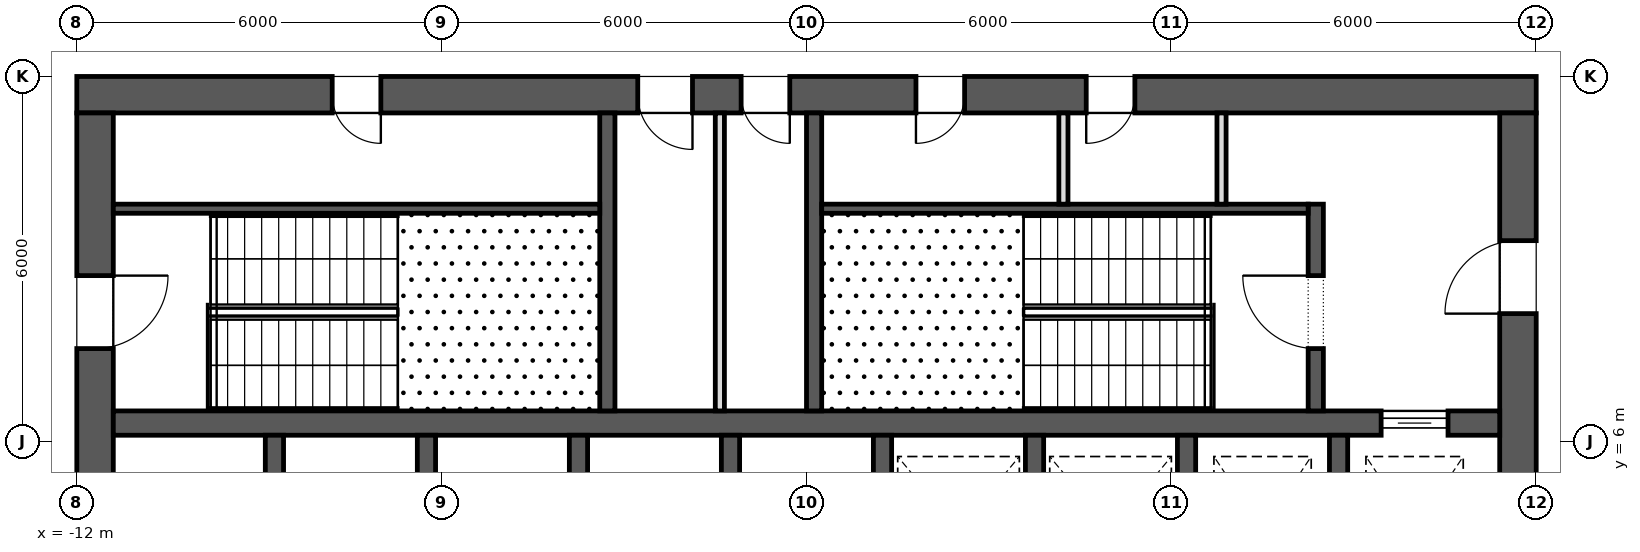
"""IFC4 building model, lengths in metres.
Left out: names, types, materials, properties, quantities, classifications, styles, units other than length and angle.
Written with IfcOpenShell. Run it as: python <this file> out.ifc"""

import sys

from ifc_helpers import new_model, si_unit, direction, frame, frame_2d, origin, place, context, subcontext, project, spatial, rectangle, extrude, element, fill, save


model = new_model("IFC4")
c1 = context("Model", 3, precision=1e-05, world=origin(), true_north=direction((0.0, 1.0)))
c2 = subcontext(c1, "Body", "Model", "MODEL_VIEW")
j1 = project(units=[si_unit("LENGTHUNIT", "METRE"), si_unit("PLANEANGLEUNIT", "RADIAN")], contexts=[c1])
p1 = place(None, origin())
s1 = spatial("IfcSite", under=j1, at=p1, CompositionType="ELEMENT")
p2 = place(p1, origin())
s2 = spatial("IfcBuilding", under=s1, at=p2, CompositionType="ELEMENT")
p3 = place(p2, frame((0.0, 0.0, 117.1)))
s3 = spatial("IfcBuildingStorey", under=s2, at=p3, CompositionType="ELEMENT", Elevation=117.1)
p4 = place(p3, frame((-12.0, 11.7, 0.0), z_axis=(0.0, 0.0, 1.0), x_axis=(1.0, 0.0, 0.0)))
e1 = element("IfcWall", 1, at=p4, inside=s3, PredefinedType="SHEAR", context=c2, shape_type="SweptSolid", body=[
    extrude(rectangle(XDim=24.0, YDim=0.6, at=frame_2d((12.0, 0.0))), origin(), (0.0, 0.0, 1.0), 4.2),
])
p5 = place(p4, frame((9.225, 0.0, 0.0)))
e2 = element("IfcOpeningElement", 2, at=p5, cuts=e1, PredefinedType="OPENING", context=c2, shape_type="SweptSolid", body=[
    extrude(rectangle(XDim=0.9, YDim=2.1, at=frame_2d((0.45, 1.05))), frame((0.0, 0.312, 0.0), z_axis=(0.0, -1.0, 0.0), x_axis=(1.0, 0.0, 0.0)), (0.0, 0.0, 1.0), 0.624),
])
p6 = place(p4, frame((10.925, 0.0, 0.0)))
e3 = element("IfcOpeningElement", 3, at=p6, cuts=e1, PredefinedType="OPENING", context=c2, shape_type="SweptSolid", body=[
    extrude(rectangle(XDim=0.8, YDim=2.1, at=frame_2d((0.4, 1.05))), frame((0.0, 0.312, 0.0), z_axis=(0.0, -1.0, 0.0), x_axis=(1.0, 0.0, 0.0)), (0.0, 0.0, 1.0), 0.624),
])
p7 = place(p4, frame((4.2, 0.0, 0.0)))
e4 = element("IfcOpeningElement", 4, at=p7, cuts=e1, PredefinedType="OPENING", context=c2, shape_type="SweptSolid", body=[
    extrude(rectangle(XDim=0.8, YDim=2.1, at=frame_2d((0.4, 1.05))), frame((0.0, 0.312, 0.0), z_axis=(0.0, -1.0, 0.0), x_axis=(1.0, 0.0, 0.0)), (0.0, 0.0, 1.0), 0.624),
])
p8 = place(p4, frame((13.8, 0.0, 0.0)))
e5 = element("IfcOpeningElement", 5, at=p8, cuts=e1, PredefinedType="OPENING", context=c2, shape_type="SweptSolid", body=[
    extrude(rectangle(XDim=0.8, YDim=2.1, at=frame_2d((0.4, 1.05))), frame((0.0, 0.312, 0.0), z_axis=(0.0, -1.0, 0.0), x_axis=(1.0, 0.0, 0.0)), (0.0, 0.0, 1.0), 0.624),
])
p9 = place(p4, frame((16.6, 0.0, 0.0)))
e6 = element("IfcOpeningElement", 6, at=p9, cuts=e1, PredefinedType="OPENING", context=c2, shape_type="SweptSolid", body=[
    extrude(rectangle(XDim=0.8, YDim=2.1, at=frame_2d((0.4, 1.05))), frame((0.0, 0.312, 0.0), z_axis=(0.0, -1.0, 0.0), x_axis=(1.0, 0.0, 0.0)), (0.0, 0.0, 1.0), 0.624),
])
p10 = place(p3, frame((11.7, -11.4, 0.0), z_axis=(0.0, 0.0, 1.0), x_axis=(0.0, 1.0, 0.0)))
e7 = element("IfcWall", 7, at=p10, inside=s3, PredefinedType="SHEAR", context=c2, shape_type="SweptSolid", body=[
    extrude(rectangle(XDim=22.8, YDim=0.6, at=frame_2d((11.4, 0.0))), origin(), (0.0, 0.0, 1.0), 4.2),
])
p11 = place(p10, frame((10.2, 0.0, 0.0)))
e8 = element("IfcOpeningElement", 8, at=p11, cuts=e7, PredefinedType="OPENING", context=c2, shape_type="SweptSolid", body=[
    extrude(rectangle(XDim=2.4, YDim=2.1, at=frame_2d((1.2, 1.05))), frame((0.0, 0.312, 0.0), z_axis=(0.0, -1.0, 0.0), x_axis=(1.0, 0.0, 0.0)), (0.0, 0.0, 1.0), 0.624),
])
p12 = place(p10, frame((19.5, 0.0, 0.0)))
e9 = element("IfcOpeningElement", 9, at=p12, cuts=e7, PredefinedType="OPENING", context=c2, shape_type="SweptSolid", body=[
    extrude(rectangle(XDim=1.2, YDim=2.1, at=frame_2d((0.6, 1.05))), frame((0.0, 0.312, 0.0), z_axis=(0.0, -1.0, 0.0), x_axis=(1.0, 0.0, 0.0)), (0.0, 0.0, 1.0), 0.624),
])
p13 = place(p10, frame((2.1, 0.0, 0.0)))
e10 = element("IfcOpeningElement", 10, at=p13, cuts=e7, PredefinedType="OPENING", context=c2, shape_type="SweptSolid", body=[
    extrude(rectangle(XDim=1.2, YDim=2.1, at=frame_2d((0.6, 1.05))), frame((0.0, 0.312, 0.0), z_axis=(0.0, -1.0, 0.0), x_axis=(1.0, 0.0, 0.0)), (0.0, 0.0, 1.0), 0.624),
])
p14 = place(p3, frame((-11.7, -11.4, 0.0), z_axis=(0.0, 0.0, 1.0), x_axis=(0.0, 1.0, 0.0)))
e11 = element("IfcWall", 11, at=p14, inside=s3, PredefinedType="SHEAR", context=c2, shape_type="SweptSolid", body=[
    extrude(rectangle(XDim=22.8, YDim=0.6, at=frame_2d((11.4, 0.0))), origin(), (0.0, 0.0, 1.0), 4.2),
])
p15 = place(p14, frame((10.2, 0.0, 0.0)))
e12 = element("IfcOpeningElement", 12, at=p15, cuts=e11, PredefinedType="OPENING", context=c2, shape_type="SweptSolid", body=[
    extrude(rectangle(XDim=2.4, YDim=2.1, at=frame_2d((1.2, 1.05))), frame((0.0, 0.312, 0.0), z_axis=(0.0, -1.0, 0.0), x_axis=(1.0, 0.0, 0.0)), (0.0, 0.0, 1.0), 0.624),
])
p16 = place(p14, frame((18.925, 0.0, 0.0)))
e13 = element("IfcOpeningElement", 13, at=p16, cuts=e11, PredefinedType="OPENING", context=c2, shape_type="SweptSolid", body=[
    extrude(rectangle(XDim=1.2, YDim=2.1, at=frame_2d((0.6, 1.05))), frame((0.0, 0.312, 0.0), z_axis=(0.0, -1.0, 0.0), x_axis=(1.0, 0.0, 0.0)), (0.0, 0.0, 1.0), 0.624),
])
p17 = place(p14, frame((2.675, 0.0, 0.0)))
e14 = element("IfcOpeningElement", 14, at=p17, cuts=e11, PredefinedType="OPENING", context=c2, shape_type="SweptSolid", body=[
    extrude(rectangle(XDim=1.2, YDim=2.1, at=frame_2d((0.6, 1.05))), frame((0.0, 0.312, 0.0), z_axis=(0.0, -1.0, 0.0), x_axis=(1.0, 0.0, 0.0)), (0.0, 0.0, 1.0), 0.624),
])
p18 = place(p3, frame((-11.4, 6.3, 0.0), z_axis=(0.0, 0.0, 1.0), x_axis=(1.0, 0.0, 0.0)))
e15 = element("IfcWall", 15, at=p18, inside=s3, PredefinedType="SHEAR", context=c2, shape_type="SweptSolid", body=[
    extrude(rectangle(XDim=22.8, YDim=0.4, at=frame_2d((11.4, 0.0))), origin(), (0.0, 0.0, 1.0), 4.2),
])
p19 = place(p18, frame((20.85, 0.0, 0.0)))
e16 = element("IfcOpeningElement", 16, at=p19, cuts=e15, PredefinedType="OPENING", context=c2, shape_type="SweptSolid", body=[
    extrude(rectangle(XDim=1.1, YDim=2.1, at=frame_2d((0.55, 1.05))), frame((0.0, 0.212, 0.0), z_axis=(0.0, -1.0, 0.0), x_axis=(1.0, 0.0, 0.0)), (0.0, 0.0, 1.0), 0.424),
])
for number, where, z_axis, x_axis in (
    (17, (-8.75, 3.2, 0.0), (0.0, 0.0, 1.0), (0.0, 1.0, 0.0)),
    (18, (-6.25, 3.2, 0.0), (0.0, 0.0, 1.0), (0.0, 1.0, 0.0)),
    (19, (-3.75, 3.2, 0.0), (0.0, 0.0, 1.0), (0.0, 1.0, 0.0)),
    (20, (-1.25, 3.2, 0.0), (0.0, 0.0, 1.0), (0.0, 1.0, 0.0)),
    (21, (1.25, 3.2, 0.0), (0.0, 0.0, 1.0), (0.0, 1.0, 0.0)),
    (22, (3.75, 3.2, 0.0), (0.0, 0.0, 1.0), (0.0, 1.0, 0.0)),
    (23, (6.25, 3.2, 0.0), (0.0, 0.0, 1.0), (0.0, 1.0, 0.0)),
    (24, (8.75, 3.2, 0.0), (0.0, 0.0, 1.0), (0.0, 1.0, 0.0)),
):
    element("IfcWall", number, at=place(p3, frame(where, z_axis=z_axis, x_axis=x_axis)), inside=s3, PredefinedType="SHEAR", context=c2, shape_type="SweptSolid", body=[
        extrude(rectangle(XDim=2.9, YDim=0.3, at=frame_2d((1.45, 0.0))), origin(), (0.0, 0.0, 1.0), 4.2),
    ])
for number, where, z_axis, x_axis in (
    (25, (-3.275, 6.5, 0.0), (0.0, 0.0, 1.0), (0.0, 1.0, 0.0)),
    (26, (0.125, 6.5, 0.0), (0.0, 0.0, 1.0), (0.0, 1.0, 0.0)),
):
    element("IfcWall", number, at=place(p3, frame(where, z_axis=z_axis, x_axis=x_axis)), inside=s3, PredefinedType="SHEAR", context=c2, shape_type="SweptSolid", body=[
        extrude(rectangle(XDim=4.9, YDim=0.25, at=frame_2d((2.45, 0.0))), origin(), (0.0, 0.0, 1.0), 3.9),
    ])
p20 = place(p3, frame((8.375, 6.5, 0.0), z_axis=(0.0, 0.0, 1.0), x_axis=(0.0, 1.0, 0.0)))
e27 = element("IfcWall", 27, at=p20, inside=s3, PredefinedType="SHEAR", context=c2, shape_type="SweptSolid", body=[
    extrude(rectangle(XDim=3.4, YDim=0.25, at=frame_2d((1.7, 0.0))), origin(), (0.0, 0.0, 1.0), 3.9),
])
p21 = place(p20, frame((1.025, 0.0, 0.0)))
e28 = element("IfcOpeningElement", 28, at=p21, cuts=e27, PredefinedType="OPENING", context=c2, shape_type="SweptSolid", body=[
    extrude(rectangle(XDim=1.2, YDim=2.1, at=frame_2d((0.6, 1.05))), frame((0.0, 0.137, 0.0), z_axis=(0.0, -1.0, 0.0), x_axis=(1.0, 0.0, 0.0)), (0.0, 0.0, 1.0), 0.274),
])
for number, where, z_axis, x_axis in (
    (29, (-11.4, 9.825, 0.0), (0.0, 0.0, 1.0), (1.0, 0.0, 0.0)),
    (30, (0.25, 9.825, 0.0), (0.0, 0.0, 1.0), (1.0, 0.0, 0.0)),
):
    element("IfcWall", number, at=place(p3, frame(where, z_axis=z_axis, x_axis=x_axis)), inside=s3, PredefinedType="SHEAR", context=c2, shape_type="SweptSolid", body=[
        extrude(rectangle(XDim=8.0, YDim=0.15, at=frame_2d((4.0, 0.0))), origin(), (0.0, 0.0, 1.0), 3.9),
    ])
p22 = place(p3, frame((-1.425, 6.5, 0.0), z_axis=(0.0, 0.0, 1.0), x_axis=(0.0, 1.0, 0.0)))
e31 = element("IfcWall", 31, at=p22, inside=s3, PredefinedType="PARTITIONING", context=c2, shape_type="SweptSolid", body=[
    extrude(rectangle(XDim=4.9, YDim=0.15, at=frame_2d((2.45, 0.0))), origin(), (0.0, 0.0, 1.0), 3.9),
])
for number, where, z_axis, x_axis in (
    (32, (4.225, 9.9, 0.0), (0.0, 0.0, 1.0), (0.0, 1.0, 0.0)),
    (33, (6.825, 9.9, 0.0), (0.0, 0.0, 1.0), (0.0, 1.0, 0.0)),
):
    element("IfcWall", number, at=place(p3, frame(where, z_axis=z_axis, x_axis=x_axis)), inside=s3, PredefinedType="PARTITIONING", context=c2, shape_type="SweptSolid", body=[
        extrude(rectangle(XDim=1.5, YDim=0.15, at=frame_2d((0.75, 0.0))), origin(), (0.0, 0.0, 1.0), 3.9),
    ])
p23 = place(p19, origin())
e34 = element("IfcDoor", 34, at=p23, inside=s3, OperationType="SLIDING_TO_LEFT", PredefinedType="DOOR", context=c2, shape_type="SweptSolid", body=[
    extrude(rectangle(XDim=1.1, YDim=2.1, at=frame_2d((0.55, 1.05))), frame((0.0, 0.025, 0.0), z_axis=(0.0, -1.0, 0.0), x_axis=(1.0, 0.0, 0.0)), (0.0, 0.0, 1.0), 0.05),
])
fill(e16, e34)
p24 = place(p16, frame((1.2, 0.0, 0.0), z_axis=(0.0, 0.0, 1.0), x_axis=(-1.0, 0.0, 0.0)))
e35 = element("IfcDoor", 35, at=p24, inside=s3, OperationType="SINGLE_SWING_RIGHT", PredefinedType="DOOR", context=c2, shape_type="SweptSolid", body=[
    extrude(rectangle(XDim=1.2, YDim=2.1, at=frame_2d((0.6, 1.05))), frame((0.0, 0.025, 0.0), z_axis=(0.0, -1.0, 0.0), x_axis=(1.0, 0.0, 0.0)), (0.0, 0.0, 1.0), 0.05),
])
fill(e13, e35)
p25 = place(p21, origin())
e36 = element("IfcDoor", 36, at=p25, inside=s3, OperationType="SINGLE_SWING_LEFT", PredefinedType="DOOR", context=c2, shape_type="SweptSolid", body=[
    extrude(rectangle(XDim=1.2, YDim=2.1, at=frame_2d((0.6, 1.05))), frame((0.0, 0.025, 0.0), z_axis=(0.0, -1.0, 0.0), x_axis=(1.0, 0.0, 0.0)), (0.0, 0.0, 1.0), 0.05),
])
fill(e28, e36)
p26 = place(p12, origin())
e37 = element("IfcDoor", 37, at=p26, inside=s3, OperationType="SINGLE_SWING_RIGHT", PredefinedType="DOOR", context=c2, shape_type="SweptSolid", body=[
    extrude(rectangle(XDim=1.2, YDim=2.1, at=frame_2d((0.6, 1.05))), frame((0.0, 0.025, 0.0), z_axis=(0.0, -1.0, 0.0), x_axis=(1.0, 0.0, 0.0)), (0.0, 0.0, 1.0), 0.05),
])
fill(e9, e37)
p27 = place(p5, frame((0.9, 0.0, 0.0), z_axis=(0.0, 0.0, 1.0), x_axis=(-1.0, 0.0, 0.0)))
e38 = element("IfcDoor", 38, at=p27, inside=s3, OperationType="SINGLE_SWING_RIGHT", PredefinedType="DOOR", context=c2, shape_type="SweptSolid", body=[
    extrude(rectangle(XDim=0.9, YDim=2.1, at=frame_2d((0.45, 1.05))), frame((0.0, 0.025, 0.0), z_axis=(0.0, -1.0, 0.0), x_axis=(1.0, 0.0, 0.0)), (0.0, 0.0, 1.0), 0.05),
])
fill(e2, e38)
p28 = place(p6, frame((0.8, 0.0, 0.0), z_axis=(0.0, 0.0, 1.0), x_axis=(-1.0, 0.0, 0.0)))
e39 = element("IfcDoor", 39, at=p28, inside=s3, OperationType="SINGLE_SWING_RIGHT", PredefinedType="DOOR", context=c2, shape_type="SweptSolid", body=[
    extrude(rectangle(XDim=0.8, YDim=2.1, at=frame_2d((0.4, 1.05))), frame((0.0, 0.025, 0.0), z_axis=(0.0, -1.0, 0.0), x_axis=(1.0, 0.0, 0.0)), (0.0, 0.0, 1.0), 0.05),
])
fill(e3, e39)
p29 = place(p7, frame((0.8, 0.0, 0.0), z_axis=(0.0, 0.0, 1.0), x_axis=(-1.0, 0.0, 0.0)))
e40 = element("IfcDoor", 40, at=p29, inside=s3, OperationType="SINGLE_SWING_RIGHT", PredefinedType="DOOR", context=c2, shape_type="SweptSolid", body=[
    extrude(rectangle(XDim=0.8, YDim=2.1, at=frame_2d((0.4, 1.05))), frame((0.0, 0.025, 0.0), z_axis=(0.0, -1.0, 0.0), x_axis=(1.0, 0.0, 0.0)), (0.0, 0.0, 1.0), 0.05),
])
fill(e4, e40)
p30 = place(p8, frame((0.8, 0.0, 0.0), z_axis=(0.0, 0.0, 1.0), x_axis=(-1.0, 0.0, 0.0)))
e41 = element("IfcDoor", 41, at=p30, inside=s3, OperationType="SINGLE_SWING_LEFT", PredefinedType="DOOR", context=c2, shape_type="SweptSolid", body=[
    extrude(rectangle(XDim=0.8, YDim=2.1, at=frame_2d((0.4, 1.05))), frame((0.0, 0.025, 0.0), z_axis=(0.0, -1.0, 0.0), x_axis=(1.0, 0.0, 0.0)), (0.0, 0.0, 1.0), 0.05),
])
fill(e5, e41)
p31 = place(p9, frame((0.8, 0.0, 0.0), z_axis=(0.0, 0.0, 1.0), x_axis=(-1.0, 0.0, 0.0)))
e42 = element("IfcDoor", 42, at=p31, inside=s3, OperationType="SINGLE_SWING_LEFT", PredefinedType="DOOR", context=c2, shape_type="SweptSolid", body=[
    extrude(rectangle(XDim=0.8, YDim=2.1, at=frame_2d((0.4, 1.05))), frame((0.0, 0.025, 0.0), z_axis=(0.0, -1.0, 0.0), x_axis=(1.0, 0.0, 0.0)), (0.0, 0.0, 1.0), 0.05),
])
fill(e6, e42)
save(model, sys.argv[1])
